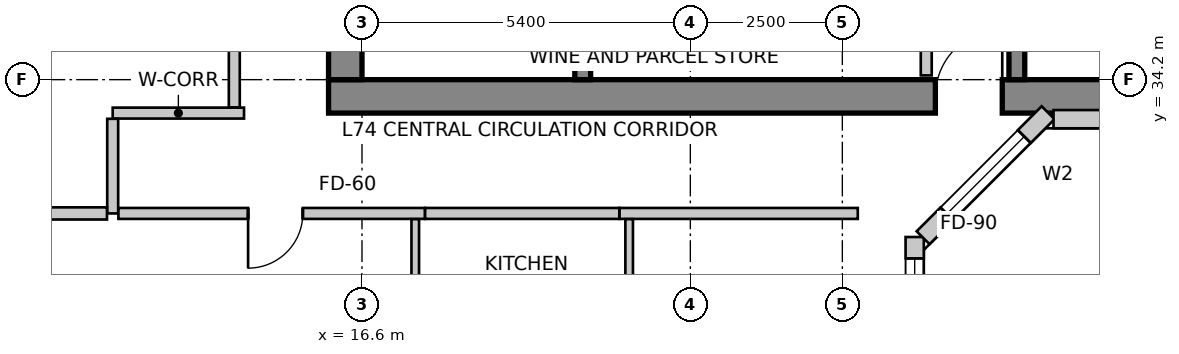
"""IFC4 building model, lengths in metres.
Left out: names, types, materials, properties, quantities, classifications, styles, units other than length and angle.
Written with IfcOpenShell. Run it as: python <this file> out.ifc"""

import sys

from ifc_helpers import new_model, si_unit, direction, frame, frame_2d, origin, place, context, subcontext, project, spatial, rectangle, extrude, source, transform, mapped, element, fill, save


model = new_model("IFC4")
c1 = context("Model", 3, precision=1e-05, world=origin(), true_north=direction((0.0, 1.0)))
c2 = subcontext(c1, "Body", "Model", "MODEL_VIEW")
j1 = project(units=[si_unit("LENGTHUNIT", "METRE"), si_unit("PLANEANGLEUNIT", "RADIAN")], contexts=[c1])
p1 = place(None, origin())
s1 = spatial("IfcSite", under=j1, at=p1, CompositionType="ELEMENT")
p2 = place(p1, origin())
s2 = spatial("IfcBuilding", under=s1, at=p2, CompositionType="ELEMENT")
p3 = place(p2, frame((0.0, 0.0, 288.9)))
s3 = spatial("IfcBuildingStorey", under=s2, at=p3, CompositionType="ELEMENT", Elevation=288.9)
p4 = place(p3, frame((16.05, 33.925, 0.0), z_axis=(0.0, 0.0, 1.0), x_axis=(1.0, 0.0, 0.0)))
e1 = element("IfcWall", 1, at=p4, inside=s3, PredefinedType="SHEAR", context=c2, shape_type="SweptSolid", body=[
    extrude(rectangle(XDim=15.5, YDim=0.55, at=frame_2d((7.75, 0.0))), origin(), (0.0, 0.0, 1.0), 3.6),
])
m1 = source(origin(), c2, "Body", "SweptSolid", [
    extrude(rectangle(XDim=1.1, YDim=2.15, at=frame_2d((0.55, 1.075))), frame((0.0, 0.285, 0.0), z_axis=(0.0, -1.0, 0.0), x_axis=(1.0, 0.0, 0.0)), (0.0, 0.0, 1.0), 0.57),
])
p5 = place(p4, frame((9.98, 0.0, 0.0)))
e2 = element("IfcOpeningElement", 2, at=p5, cuts=e1, PredefinedType="OPENING", context=c2, shape_type="MappedRepresentation", body=[
    mapped(m1, transform((0.0, 0.0, 0.0), scale=1.0)),
])
p6 = place(p3, frame((16.325, 34.2, 0.0), z_axis=(0.0, 0.0, 1.0), x_axis=(0.0, 1.0, 0.0)))
e3 = element("IfcWall", 3, at=p6, inside=s3, PredefinedType="SHEAR", context=c2, shape_type="SweptSolid", body=[
    extrude(rectangle(XDim=11.4, YDim=0.55, at=frame_2d((5.7, 0.0))), origin(), (0.0, 0.0, 1.0), 3.6),
])
p7 = place(p6, frame((7.15, 0.0, 0.0)))
e4 = element("IfcOpeningElement", 4, at=p7, cuts=e3, PredefinedType="OPENING", context=c2, shape_type="MappedRepresentation", body=[
    mapped(m1, transform((0.0, 0.0, 0.0), scale=1.0)),
])
p8 = place(p3, frame((20.23, 34.2, 0.0), z_axis=(0.0, 0.0, 1.0), x_axis=(0.0, 1.0, 0.0)))
e5 = element("IfcWall", 5, at=p8, inside=s3, PredefinedType="SHEAR", context=c2, shape_type="SweptSolid", body=[
    extrude(rectangle(XDim=9.06, YDim=0.26, at=frame_2d((4.53, 0.0))), origin(), (0.0, 0.0, 1.0), 3.6),
])
m2 = source(origin(), c2, "Body", "SweptSolid", [
    extrude(rectangle(XDim=1.1, YDim=2.15, at=frame_2d((0.55, 1.075))), frame((0.0, 0.14, 0.0), z_axis=(0.0, -1.0, 0.0), x_axis=(1.0, 0.0, 0.0)), (0.0, 0.0, 1.0), 0.28),
])
p9 = place(p8, frame((7.45, 0.0, 0.0)))
e6 = element("IfcOpeningElement", 6, at=p9, cuts=e5, PredefinedType="OPENING", context=c2, shape_type="MappedRepresentation", body=[
    mapped(m2, transform((0.0, 0.0, 0.0), scale=1.0)),
])
p10 = place(p3, frame((27.37, 34.2, 0.0), z_axis=(0.0, 0.0, 1.0), x_axis=(0.0, 1.0, 0.0)))
e7 = element("IfcWall", 7, at=p10, inside=s3, PredefinedType="SHEAR", context=c2, shape_type="SweptSolid", body=[
    extrude(rectangle(XDim=9.06, YDim=0.26, at=frame_2d((4.53, 0.0))), origin(), (0.0, 0.0, 1.0), 3.6),
])
p11 = place(p10, frame((7.45, 0.0, 0.0)))
e8 = element("IfcOpeningElement", 8, at=p11, cuts=e7, PredefinedType="OPENING", context=c2, shape_type="MappedRepresentation", body=[
    mapped(m2, transform((0.0, 0.0, 0.0), scale=1.0)),
])
p12 = place(p3, frame((25.69, 24.957, 0.0), z_axis=(0.0, 0.0, 1.0), x_axis=(0.0, 1.0, 0.0)))
e9 = element("IfcWall", 9, at=p12, inside=s3, PredefinedType="SOLIDWALL", context=c2, shape_type="SweptSolid", body=[
    extrude(rectangle(XDim=6.655, YDim=0.3, at=frame_2d((3.327, 0.0))), origin(), (0.0, 0.0, 1.0), 3.35),
])
m3 = source(origin(), c2, "Body", "SweptSolid", [
    extrude(rectangle(XDim=1.6, YDim=2.15, at=frame_2d((0.8, 1.075))), frame((0.0, 0.16, 0.0), z_axis=(0.0, -1.0, 0.0), x_axis=(1.0, 0.0, 0.0)), (0.0, 0.0, 1.0), 0.32),
])
p13 = place(p12, frame((2.293, 0.0, 0.0)))
e10 = element("IfcOpeningElement", 10, at=p13, cuts=e9, PredefinedType="OPENING", context=c2, shape_type="MappedRepresentation", body=[
    mapped(m3, transform((0.0, 0.0, 0.0), scale=1.0)),
])
m4 = source(origin(), c2, "Body", "SweptSolid", [
    extrude(rectangle(XDim=1.2, YDim=1.6, at=frame_2d((0.6, 0.8))), frame((0.0, 0.16, 0.0), z_axis=(0.0, -1.0, 0.0), x_axis=(1.0, 0.0, 0.0)), (0.0, 0.0, 1.0), 0.32),
])
p14 = place(p12, frame((0.413, 0.0, 0.85)))
e11 = element("IfcOpeningElement", 11, at=p14, cuts=e9, PredefinedType="OPENING", context=c2, shape_type="MappedRepresentation", body=[
    mapped(m4, transform((0.0, 0.0, 0.0), scale=1.0)),
])
m5 = source(origin(), c2, "Body", "SweptSolid", [
    extrude(rectangle(XDim=2.1, YDim=2.0, at=frame_2d((1.05, 1.0))), frame((0.0, 0.16, 0.0), z_axis=(0.0, -1.0, 0.0), x_axis=(1.0, 0.0, 0.0)), (0.0, 0.0, 1.0), 0.32),
])
p15 = place(p12, frame((4.204, 0.0, 0.85)))
e12 = element("IfcOpeningElement", 12, at=p15, cuts=e9, PredefinedType="OPENING", context=c2, shape_type="MappedRepresentation", body=[
    mapped(m5, transform((0.0, 0.0, 0.0), scale=1.0)),
])
p16 = place(p3, frame((25.828, 31.6, 0.0), z_axis=(0.0, 0.0, 1.0), x_axis=(0.707106781187, 0.707106781187, 0.0)))
e13 = element("IfcWall", 13, at=p16, inside=s3, PredefinedType="SOLIDWALL", context=c2, shape_type="SweptSolid", body=[
    extrude(rectangle(XDim=2.907, YDim=0.3, at=frame_2d((1.454, 0.0))), origin(), (0.0, 0.0, 1.0), 3.35),
])
m6 = source(origin(), c2, "Body", "SweptSolid", [
    extrude(rectangle(XDim=1.8, YDim=2.1, at=frame_2d((0.9, 1.05))), frame((0.0, 0.16, 0.0), z_axis=(0.0, -1.0, 0.0), x_axis=(1.0, 0.0, 0.0)), (0.0, 0.0, 1.0), 0.32),
])
p17 = place(p16, frame((0.554, 0.0, 0.85)))
e14 = element("IfcOpeningElement", 14, at=p17, cuts=e13, PredefinedType="OPENING", context=c2, shape_type="MappedRepresentation", body=[
    mapped(m6, transform((0.0, 0.0, 0.0), scale=1.0)),
])
p18 = place(p3, frame((27.973, 33.55, 0.0), z_axis=(0.0, 0.0, 1.0), x_axis=(1.0, 0.0, 0.0)))
e15 = element("IfcWall", 15, at=p18, inside=s3, PredefinedType="SOLIDWALL", context=c2, shape_type="SweptSolid", body=[
    extrude(rectangle(XDim=9.115, YDim=0.3, at=frame_2d((4.558, 0.0))), origin(), (0.0, 0.0, 1.0), 3.35),
])
m7 = source(origin(), c2, "Body", "SweptSolid", [
    extrude(rectangle(XDim=2.4, YDim=2.2, at=frame_2d((1.2, 1.1))), frame((0.0, 0.16, 0.0), z_axis=(0.0, -1.0, 0.0), x_axis=(1.0, 0.0, 0.0)), (0.0, 0.0, 1.0), 0.32),
])
p19 = place(p18, frame((1.239, 0.0, 0.85)))
e16 = element("IfcOpeningElement", 16, at=p19, cuts=e15, PredefinedType="OPENING", context=c2, shape_type="MappedRepresentation", body=[
    mapped(m7, transform((0.0, 0.0, 0.0), scale=1.0)),
])
p20 = place(p18, frame((5.626, 0.0, 0.85)))
e17 = element("IfcOpeningElement", 17, at=p20, cuts=e15, PredefinedType="OPENING", context=c2, shape_type="MappedRepresentation", body=[
    mapped(m5, transform((0.0, 0.0, 0.0), scale=1.0)),
])
p21 = place(p3, frame((25.88, 35.956, 0.0), z_axis=(0.0, 0.0, 1.0), x_axis=(0.0, -1.0, 0.0)))
e18 = element("IfcWall", 18, at=p21, inside=s3, PredefinedType="PARTITIONING", context=c2, shape_type="SweptSolid", body=[
    extrude(rectangle(XDim=1.686, YDim=0.18, at=frame_2d((0.843, 0.0))), origin(), (0.0, 0.0, 1.0), 2.642),
])
p22 = place(p3, frame((12.5, 33.65, 0.0), z_axis=(0.0, 0.0, 1.0), x_axis=(1.0, 0.0, 0.0)))
e19 = element("IfcWall", 19, at=p22, inside=s3, PredefinedType="PARTITIONING", context=c2, shape_type="SweptSolid", body=[
    extrude(rectangle(XDim=2.16, YDim=0.18, at=frame_2d((1.08, 0.0))), origin(), (0.0, 0.0, 1.0), 3.35),
])
p23 = place(p3, frame((12.5, 32.0, 0.0), z_axis=(0.0, 0.0, 1.0), x_axis=(0.0, 1.0, 0.0)))
e20 = element("IfcWall", 20, at=p23, inside=s3, PredefinedType="PARTITIONING", context=c2, shape_type="SweptSolid", body=[
    extrude(rectangle(XDim=1.556, YDim=0.18, at=frame_2d((0.778, 0.0))), origin(), (0.0, 0.0, 1.0), 3.034),
])
p24 = place(p3, frame((24.754, 32.0, 0.0), z_axis=(0.0, 0.0, 1.0), x_axis=(-1.0, 0.0, 0.0)))
e21 = element("IfcWall", 21, at=p24, inside=s3, PredefinedType="PARTITIONING", context=c2, shape_type="SweptSolid", body=[
    extrude(rectangle(XDim=3.92, YDim=0.18, at=frame_2d((1.96, 0.0))), origin(), (0.0, 0.0, 1.0), 3.034),
])
p25 = place(p3, frame((17.636, 32.0, 0.0), z_axis=(0.0, 0.0, 1.0), x_axis=(-1.0, 0.0, 0.0)))
e22 = element("IfcWall", 22, at=p25, inside=s3, PredefinedType="PARTITIONING", context=c2, shape_type="SweptSolid", body=[
    extrude(rectangle(XDim=5.042, YDim=0.18, at=frame_2d((2.521, 0.0))), origin(), (0.0, 0.0, 1.0), 3.034),
])
m8 = source(origin(), c2, "Body", "SweptSolid", [
    extrude(rectangle(XDim=0.9, YDim=2.15, at=frame_2d((0.45, 1.075))), frame((0.0, 0.1, 0.0), z_axis=(0.0, -1.0, 0.0), x_axis=(1.0, 0.0, 0.0)), (0.0, 0.0, 1.0), 0.2),
])
p26 = place(p25, frame((2.009, 0.0, 0.0)))
e23 = element("IfcOpeningElement", 23, at=p26, cuts=e22, PredefinedType="OPENING", context=c2, shape_type="MappedRepresentation", body=[
    mapped(m8, transform((0.0, 0.0, 0.0), scale=1.0)),
])
p27 = place(p3, frame((20.832, 32.0, 0.0), z_axis=(0.0, 0.0, 1.0), x_axis=(-1.0, 0.0, 0.0)))
e24 = element("IfcWall", 24, at=p27, inside=s3, PredefinedType="PARTITIONING", context=c2, shape_type="SweptSolid", body=[
    extrude(rectangle(XDim=3.194, YDim=0.18, at=frame_2d((1.597, 0.0))), origin(), (0.0, 0.0, 1.0), 3.35),
])
p28 = place(p3, frame((14.5, 33.744, 0.0), z_axis=(0.0, 0.0, 1.0), x_axis=(0.0, 1.0, 0.0)))
e25 = element("IfcWall", 25, at=p28, inside=s3, PredefinedType="PARTITIONING", context=c2, shape_type="SweptSolid", body=[
    extrude(rectangle(XDim=12.406, YDim=0.18, at=frame_2d((6.203, 0.0))), origin(), (0.0, 0.0, 1.0), 3.35),
])
p29 = place(p28, frame((4.37, 0.0, 0.0)))
e26 = element("IfcOpeningElement", 26, at=p29, cuts=e25, PredefinedType="OPENING", context=c2, shape_type="MappedRepresentation", body=[
    mapped(m8, transform((0.0, 0.0, 0.0), scale=1.0)),
])
p30 = place(p3, frame((12.406, 32.0, 0.0), z_axis=(0.0, 0.0, 1.0), x_axis=(-1.0, 0.0, 0.0)))
e27 = element("IfcWall", 27, at=p30, inside=s3, PredefinedType="PARTITIONING", context=c2, shape_type="SweptSolid", body=[
    extrude(rectangle(XDim=4.126, YDim=0.2, at=frame_2d((2.063, 0.0))), origin(), (0.0, 0.0, 1.0), 2.642),
])
p31 = place(p3, frame((20.994, 26.883, 0.0), z_axis=(0.0, 0.0, 1.0), x_axis=(0.0, 1.0, 0.0)))
e28 = element("IfcWall", 28, at=p31, inside=s3, PredefinedType="PARTITIONING", context=c2, shape_type="SweptSolid", body=[
    extrude(rectangle(XDim=5.023, YDim=0.125, at=frame_2d((2.511, 0.0))), origin(), (0.0, 0.0, 1.0), 2.979),
])
m9 = source(origin(), c2, "Body", "SweptSolid", [
    extrude(rectangle(XDim=0.9, YDim=2.15, at=frame_2d((0.45, 1.075))), frame((0.0, 0.073, 0.0), z_axis=(0.0, -1.0, 0.0), x_axis=(1.0, 0.0, 0.0)), (0.0, 0.0, 1.0), 0.145),
])
p32 = place(p31, frame((2.0, 0.0, 0.0)))
e29 = element("IfcOpeningElement", 29, at=p32, cuts=e28, PredefinedType="OPENING", context=c2, shape_type="MappedRepresentation", body=[
    mapped(m9, transform((0.0, 0.0, 0.0), scale=1.0)),
])
p33 = place(p3, frame((17.476, 31.906, 0.0), z_axis=(0.0, 0.0, 1.0), x_axis=(0.0, -1.0, 0.0)))
e30 = element("IfcWall", 30, at=p33, inside=s3, PredefinedType="PARTITIONING", context=c2, shape_type="SweptSolid", body=[
    extrude(rectangle(XDim=5.023, YDim=0.125, at=frame_2d((2.511, 0.0))), origin(), (0.0, 0.0, 1.0), 2.979),
])
m10 = source(origin(), c2, "Body", "SweptSolid", [
    extrude(rectangle(XDim=0.85, YDim=2.15, at=frame_2d((0.425, 1.075))), frame((0.0, 0.073, 0.0), z_axis=(0.0, -1.0, 0.0), x_axis=(1.0, 0.0, 0.0)), (0.0, 0.0, 1.0), 0.145),
])
p34 = place(p33, frame((2.086, 0.0, 0.0)))
e31 = element("IfcOpeningElement", 31, at=p34, cuts=e30, PredefinedType="OPENING", context=c2, shape_type="MappedRepresentation", body=[
    mapped(m10, transform((0.0, 0.0, 0.0), scale=1.0)),
])
m11 = source(origin(), c2, "Body", "SweptSolid", [
    extrude(rectangle(XDim=2.1, YDim=2.0, at=frame_2d((1.05, 1.0))), frame((0.0, -0.015, 0.0), z_axis=(0.0, -1.0, 0.0), x_axis=(1.0, 0.0, 0.0)), (0.0, 0.0, 1.0), 0.06),
])
p35 = place(p15, origin())
e32 = element("IfcWindow", 32, at=p35, inside=s3, PartitioningType="SINGLE_PANEL", PredefinedType="WINDOW", context=c2, shape_type="MappedRepresentation", body=[
    mapped(m11, transform((0.0, 0.0, 0.0), scale=1.0)),
])
fill(e12, e32)
m12 = source(origin(), c2, "Body", "SweptSolid", [
    extrude(rectangle(XDim=1.8, YDim=2.1, at=frame_2d((0.9, 1.05))), frame((0.0, -0.015, 0.0), z_axis=(0.0, -1.0, 0.0), x_axis=(1.0, 0.0, 0.0)), (0.0, 0.0, 1.0), 0.06),
])
p36 = place(p17, origin())
e33 = element("IfcWindow", 33, at=p36, inside=s3, PartitioningType="SINGLE_PANEL", PredefinedType="WINDOW", context=c2, shape_type="MappedRepresentation", body=[
    mapped(m12, transform((0.0, 0.0, 0.0), scale=1.0)),
])
fill(e14, e33)
m13 = source(origin(), c2, "Body", "SweptSolid", [
    extrude(rectangle(XDim=1.1, YDim=2.15, at=frame_2d((0.55, 1.075))), frame((0.0, 0.025, 0.0), z_axis=(0.0, -1.0, 0.0), x_axis=(1.0, 0.0, 0.0)), (0.0, 0.0, 1.0), 0.05),
])
p37 = place(p5, origin())
e34 = element("IfcDoor", 34, at=p37, inside=s3, OperationType="SINGLE_SWING_RIGHT", PredefinedType="DOOR", context=c2, shape_type="MappedRepresentation", body=[
    mapped(m13, transform((0.0, 0.0, 0.0), scale=1.0)),
])
fill(e2, e34)
m14 = source(origin(), c2, "Body", "SweptSolid", [
    extrude(rectangle(XDim=0.9, YDim=2.15, at=frame_2d((0.45, 1.075))), frame((0.0, 0.025, 0.0), z_axis=(0.0, -1.0, 0.0), x_axis=(1.0, 0.0, 0.0)), (0.0, 0.0, 1.0), 0.05),
])
p38 = place(p26, origin())
e35 = element("IfcDoor", 35, at=p38, inside=s3, OperationType="SINGLE_SWING_RIGHT", PredefinedType="DOOR", context=c2, shape_type="MappedRepresentation", body=[
    mapped(m14, transform((0.0, 0.0, 0.0), scale=1.0)),
])
fill(e23, e35)
save(model, sys.argv[1])
